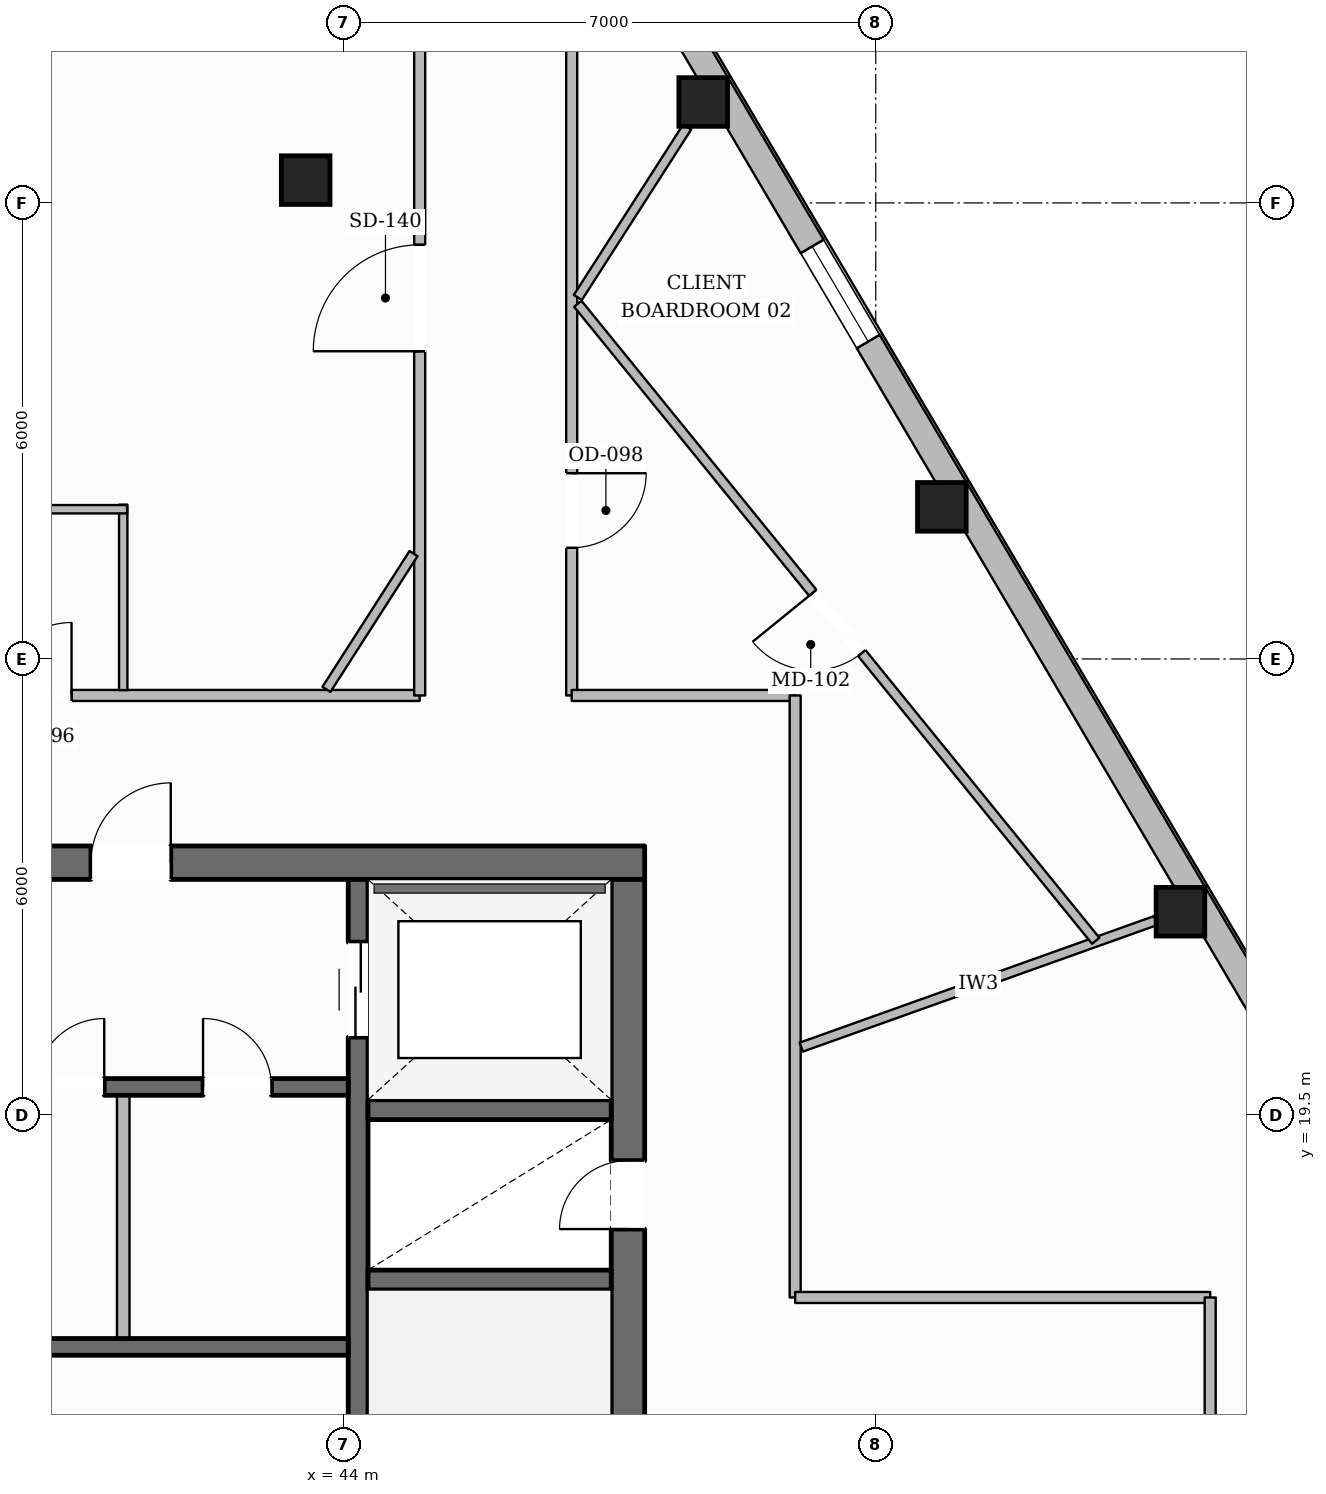
"""IFC4 building model, lengths in metres.
Left out: names, types, materials, properties, quantities, classifications, styles, units other than length and angle.
Written with IfcOpenShell. Run it as: python <this file> out.ifc"""

import sys

from ifc_helpers import new_model, si_unit, direction, frame, frame_2d, origin, origin_2d, place, context, subcontext, project, spatial, rectangle, hollow_rectangle, extrude, element, fill, save


model = new_model("IFC4")
c1 = context("Model", 3, precision=1e-05, world=origin(), true_north=direction((0.0, 1.0)))
c2 = subcontext(c1, "Body", "Model", "MODEL_VIEW")
j1 = project(units=[si_unit("LENGTHUNIT", "METRE"), si_unit("PLANEANGLEUNIT", "RADIAN")], contexts=[c1])
p1 = place(None, origin())
s1 = spatial("IfcSite", under=j1, at=p1, CompositionType="ELEMENT")
p2 = place(p1, origin())
s2 = spatial("IfcBuilding", under=s1, at=p2, CompositionType="ELEMENT")
p3 = place(p2, frame((0.0, 0.0, 195.8)))
s3 = spatial("IfcBuildingStorey", under=s2, at=p3, CompositionType="ELEMENT", Elevation=195.8)
p4 = place(p3, frame((28.04, 22.82, 0.0), z_axis=(0.0, 0.0, 1.0), x_axis=(1.0, 0.0, 0.0)))
e1 = element("IfcWall", 1, at=p4, inside=s3, PredefinedType="SOLIDWALL", context=c2, shape_type="SweptSolid", body=[
    extrude(rectangle(XDim=19.92, YDim=0.44, at=frame_2d((9.96, 0.0))), origin(), (0.0, 0.0, 1.0), 3.6),
])
p5 = place(p4, frame((6.235, 0.0, 0.0)))
e2 = element("IfcOpeningElement", 2, at=p5, cuts=e1, PredefinedType="OPENING", context=c2, shape_type="SweptSolid", body=[
    extrude(rectangle(XDim=1.05, YDim=2.15, at=frame_2d((0.525, 1.075))), frame((0.0, 0.23, 0.0), z_axis=(0.0, -1.0, 0.0), x_axis=(1.0, 0.0, 0.0)), (0.0, 0.0, 1.0), 0.46),
])
p6 = place(p4, frame((12.635, 0.0, 0.0)))
e3 = element("IfcOpeningElement", 3, at=p6, cuts=e1, PredefinedType="OPENING", context=c2, shape_type="SweptSolid", body=[
    extrude(rectangle(XDim=1.05, YDim=2.15, at=frame_2d((0.525, 1.075))), frame((0.0, 0.23, 0.0), z_axis=(0.0, -1.0, 0.0), x_axis=(1.0, 0.0, 0.0)), (0.0, 0.0, 1.0), 0.46),
])
p7 = place(p3, frame((47.74, 9.6, 0.0), z_axis=(0.0, 0.0, 1.0), x_axis=(0.0, 1.0, 0.0)))
e4 = element("IfcWall", 4, at=p7, inside=s3, PredefinedType="SOLIDWALL", context=c2, shape_type="SweptSolid", body=[
    extrude(rectangle(XDim=13.0, YDim=0.44, at=frame_2d((6.5, 0.0))), origin(), (0.0, 0.0, 1.0), 3.6),
])
p8 = place(p7, frame((0.2, 0.0, 0.0)))
e5 = element("IfcOpeningElement", 5, at=p8, cuts=e4, PredefinedType="OPENING", context=c2, shape_type="SweptSolid", body=[
    extrude(rectangle(XDim=1.1, YDim=2.15, at=frame_2d((0.55, 1.075))), frame((0.0, 0.23, 0.0), z_axis=(0.0, -1.0, 0.0), x_axis=(1.0, 0.0, 0.0)), (0.0, 0.0, 1.0), 0.46),
])
p9 = place(p7, frame((8.4, 0.0, 0.0)))
e6 = element("IfcOpeningElement", 6, at=p9, cuts=e4, PredefinedType="OPENING", context=c2, shape_type="SweptSolid", body=[
    extrude(rectangle(XDim=0.9, YDim=2.1, at=frame_2d((0.45, 1.05))), frame((0.0, 0.23, 0.0), z_axis=(0.0, -1.0, 0.0), x_axis=(1.0, 0.0, 0.0)), (0.0, 0.0, 1.0), 0.46),
])
p10 = place(p3, frame((44.19, 9.6, 0.0), z_axis=(0.0, 0.0, 1.0), x_axis=(0.0, 1.0, 0.0)))
e7 = element("IfcWall", 7, at=p10, inside=s3, PredefinedType="SHEAR", context=c2, shape_type="SweptSolid", body=[
    extrude(rectangle(XDim=13.0, YDim=0.26, at=frame_2d((6.5, 0.0))), origin(), (0.0, 0.0, 1.0), 3.6),
])
p11 = place(p10, frame((10.925, 0.0, 0.0)))
e8 = element("IfcOpeningElement", 8, at=p11, cuts=e7, PredefinedType="OPENING", context=c2, shape_type="SweptSolid", body=[
    extrude(rectangle(XDim=1.25, YDim=2.25, at=frame_2d((0.625, 1.125))), frame((0.0, 0.14, 0.0), z_axis=(0.0, -1.0, 0.0), x_axis=(1.0, 0.0, 0.0)), (0.0, 0.0, 1.0), 0.28),
])
for number, where, z_axis, x_axis in (
    (9, (44.32, 17.33, 0.0), (0.0, 0.0, 1.0), (1.0, 0.0, 0.0)),
    (10, (44.32, 19.57, 0.0), (0.0, 0.0, 1.0), (1.0, 0.0, 0.0)),
):
    element("IfcWall", number, at=place(p3, frame(where, z_axis=z_axis, x_axis=x_axis)), inside=s3, PredefinedType="SHEAR", context=c2, shape_type="SweptSolid", body=[
        extrude(rectangle(XDim=3.2, YDim=0.26, at=frame_2d((1.6, 0.0))), origin(), (0.0, 0.0, 1.0), 3.6),
    ])
p12 = place(p3, frame((31.94, 19.87, 0.0), z_axis=(0.0, 0.0, 1.0), x_axis=(1.0, 0.0, 0.0)))
e11 = element("IfcWall", 11, at=p12, inside=s3, PredefinedType="SOLIDWALL", context=c2, shape_type="SweptSolid", body=[
    extrude(rectangle(XDim=12.12, YDim=0.22, at=frame_2d((6.06, 0.0))), origin(), (0.0, 0.0, 1.0), 3.6),
])
p13 = place(p12, frame((6.3, 0.0, 0.0)))
e12 = element("IfcOpeningElement", 12, at=p13, cuts=e11, PredefinedType="OPENING", context=c2, shape_type="SweptSolid", body=[
    extrude(rectangle(XDim=1.1, YDim=2.15, at=frame_2d((0.55, 1.075))), frame((0.0, 0.12, 0.0), z_axis=(0.0, -1.0, 0.0), x_axis=(1.0, 0.0, 0.0)), (0.0, 0.0, 1.0), 0.24),
])
p14 = place(p12, frame((8.01, 0.0, 0.0)))
e13 = element("IfcOpeningElement", 13, at=p14, cuts=e11, PredefinedType="OPENING", context=c2, shape_type="SweptSolid", body=[
    extrude(rectangle(XDim=0.9, YDim=2.1, at=frame_2d((0.45, 1.05))), frame((0.0, 0.12, 0.0), z_axis=(0.0, -1.0, 0.0), x_axis=(1.0, 0.0, 0.0)), (0.0, 0.0, 1.0), 0.24),
])
p15 = place(p12, frame((10.21, 0.0, 0.0)))
e14 = element("IfcOpeningElement", 14, at=p15, cuts=e11, PredefinedType="OPENING", context=c2, shape_type="SweptSolid", body=[
    extrude(rectangle(XDim=0.9, YDim=2.1, at=frame_2d((0.45, 1.05))), frame((0.0, 0.12, 0.0), z_axis=(0.0, -1.0, 0.0), x_axis=(1.0, 0.0, 0.0)), (0.0, 0.0, 1.0), 0.24),
])
p16 = place(p3, frame((31.94, 16.45, 0.0), z_axis=(0.0, 0.0, 1.0), x_axis=(1.0, 0.0, 0.0)))
e15 = element("IfcWall", 15, at=p16, inside=s3, PredefinedType="SOLIDWALL", context=c2, shape_type="SweptSolid", body=[
    extrude(rectangle(XDim=12.12, YDim=0.22, at=frame_2d((6.06, 0.0))), origin(), (0.0, 0.0, 1.0), 3.6),
])
for number, where, z_axis, x_axis in (
    (16, (55.009, 22.175, 0.0), (0.0, 0.0, 1.0), (1.0, 0.0, 0.0)),
    (17, (51.87, 27.501, 0.0), (0.0, 0.0, 1.0), (1.0, 0.0, 0.0)),
    (18, (48.73, 32.828, 0.0), (0.0, 0.0, 1.0), (1.0, 0.0, 0.0)),
    (19, (43.5, 31.8, 0.0), (0.0, 0.0, 1.0), (1.0, 0.0, 0.0)),
):
    element("IfcColumn", number, at=place(p3, frame(where, z_axis=z_axis, x_axis=x_axis)), inside=s3, PredefinedType="COLUMN", context=c2, shape_type="SweptSolid", body=[
        extrude(hollow_rectangle(XDim=0.64, YDim=0.64, WallThickness=0.028, at=origin_2d()), origin(), (0.0, 0.0, 1.0), 3.6),
    ])
p17 = place(p3, frame((42.444, 44.024, 0.0), z_axis=(0.0, 0.0, 1.0), x_axis=(0.507770038723, -0.861492651028, 0.0)))
e20 = element("IfcWall", 20, at=p17, inside=s3, PredefinedType="STANDARD", context=c2, shape_type="SweptSolid", body=[
    extrude(rectangle(XDim=38.049, YDim=0.35, at=frame_2d((19.024, 0.0))), origin(), (0.0, 0.0, 1.0), 3.132),
])
p18 = place(p17, frame((33.752, 0.0, 0.65)))
e21 = element("IfcOpeningElement", 21, at=p18, cuts=e20, PredefinedType="OPENING", context=c2, shape_type="SweptSolid", body=[
    extrude(rectangle(XDim=1.45, YDim=1.75, at=frame_2d((0.725, 0.875))), frame((0.0, 0.185, 0.0), z_axis=(0.0, -1.0, 0.0), x_axis=(1.0, 0.0, 0.0)), (0.0, 0.0, 1.0), 0.37),
])
p19 = place(p17, frame((27.569, 0.0, 0.65)))
e22 = element("IfcOpeningElement", 22, at=p19, cuts=e20, PredefinedType="OPENING", context=c2, shape_type="SweptSolid", body=[
    extrude(rectangle(XDim=1.45, YDim=1.75, at=frame_2d((0.725, 0.875))), frame((0.0, 0.185, 0.0), z_axis=(0.0, -1.0, 0.0), x_axis=(1.0, 0.0, 0.0)), (0.0, 0.0, 1.0), 0.37),
])
p20 = place(p17, frame((15.204, 0.0, 0.65)))
e23 = element("IfcOpeningElement", 23, at=p20, cuts=e20, PredefinedType="OPENING", context=c2, shape_type="SweptSolid", body=[
    extrude(rectangle(XDim=1.45, YDim=1.75, at=frame_2d((0.725, 0.875))), frame((0.0, 0.185, 0.0), z_axis=(0.0, -1.0, 0.0), x_axis=(1.0, 0.0, 0.0)), (0.0, 0.0, 1.0), 0.37),
])
p21 = place(p17, frame((9.021, 0.0, 0.65)))
e24 = element("IfcOpeningElement", 24, at=p21, cuts=e20, PredefinedType="OPENING", context=c2, shape_type="SweptSolid", body=[
    extrude(rectangle(XDim=1.45, YDim=1.75, at=frame_2d((0.725, 0.875))), frame((0.0, 0.185, 0.0), z_axis=(0.0, -1.0, 0.0), x_axis=(1.0, 0.0, 0.0)), (0.0, 0.0, 1.0), 0.37),
])
p22 = place(p17, frame((2.839, 0.0, 0.65)))
e25 = element("IfcOpeningElement", 25, at=p22, cuts=e20, PredefinedType="OPENING", context=c2, shape_type="SweptSolid", body=[
    extrude(rectangle(XDim=1.45, YDim=1.75, at=frame_2d((0.725, 0.875))), frame((0.0, 0.185, 0.0), z_axis=(0.0, -1.0, 0.0), x_axis=(1.0, 0.0, 0.0)), (0.0, 0.0, 1.0), 0.37),
])
p23 = place(p3, frame((41.1, 16.56, 0.0), z_axis=(0.0, 0.0, 1.0), x_axis=(0.0, 1.0, 0.0)))
e26 = element("IfcWall", 26, at=p23, inside=s3, PredefinedType="PARTITIONING", context=c2, shape_type="SweptSolid", body=[
    extrude(rectangle(XDim=3.2, YDim=0.165, at=frame_2d((1.6, 0.0))), origin(), (0.0, 0.0, 1.0), 3.6),
])
p24 = place(p3, frame((31.0, 25.02, 0.0), z_axis=(0.0, 0.0, 1.0), x_axis=(1.0, 0.0, 0.0)))
e27 = element("IfcWall", 27, at=p24, inside=s3, PredefinedType="PARTITIONING", context=c2, shape_type="SweptSolid", body=[
    extrude(rectangle(XDim=14.0, YDim=0.145, at=frame_2d((7.0, 0.0))), origin(), (0.0, 0.0, 1.0), 3.6),
])
p25 = place(p24, frame((3.56, 0.0, 0.0)))
e28 = element("IfcOpeningElement", 28, at=p25, cuts=e27, PredefinedType="OPENING", context=c2, shape_type="SweptSolid", body=[
    extrude(rectangle(XDim=0.88, YDim=2.1, at=frame_2d((0.44, 1.05))), frame((0.0, 0.083, 0.0), z_axis=(0.0, -1.0, 0.0), x_axis=(1.0, 0.0, 0.0)), (0.0, 0.0, 1.0), 0.165),
])
p26 = place(p24, frame((6.08, 0.0, 0.0)))
e29 = element("IfcOpeningElement", 29, at=p26, cuts=e27, PredefinedType="OPENING", context=c2, shape_type="SweptSolid", body=[
    extrude(rectangle(XDim=0.88, YDim=2.1, at=frame_2d((0.44, 1.05))), frame((0.0, 0.083, 0.0), z_axis=(0.0, -1.0, 0.0), x_axis=(1.0, 0.0, 0.0)), (0.0, 0.0, 1.0), 0.165),
])
p27 = place(p24, frame((8.46, 0.0, 0.0)))
e30 = element("IfcOpeningElement", 30, at=p27, cuts=e27, PredefinedType="OPENING", context=c2, shape_type="SweptSolid", body=[
    extrude(rectangle(XDim=0.96, YDim=2.1, at=frame_2d((0.48, 1.05))), frame((0.0, 0.083, 0.0), z_axis=(0.0, -1.0, 0.0), x_axis=(1.0, 0.0, 0.0)), (0.0, 0.0, 1.0), 0.165),
])
p28 = place(p3, frame((45.0, 25.02, 0.0), z_axis=(0.0, 0.0, 1.0), x_axis=(0.0, 1.0, 0.0)))
e31 = element("IfcWall", 31, at=p28, inside=s3, PredefinedType="PARTITIONING", context=c2, shape_type="SweptSolid", body=[
    extrude(rectangle(XDim=8.642, YDim=0.145, at=frame_2d((4.321, 0.0))), origin(), (0.0, 0.0, 1.0), 3.6),
])
p29 = place(p28, frame((4.529, 0.0, 0.0)))
e32 = element("IfcOpeningElement", 32, at=p29, cuts=e31, PredefinedType="OPENING", context=c2, shape_type="SweptSolid", body=[
    extrude(rectangle(XDim=1.4, YDim=2.2, at=frame_2d((0.7, 1.1))), frame((0.0, 0.083, 0.0), z_axis=(0.0, -1.0, 0.0), x_axis=(1.0, 0.0, 0.0)), (0.0, 0.0, 1.0), 0.165),
])
p30 = place(p3, frame((47.0, 33.662, 0.0), z_axis=(0.0, 0.0, 1.0), x_axis=(0.0, -1.0, 0.0)))
e33 = element("IfcWall", 33, at=p30, inside=s3, PredefinedType="PARTITIONING", context=c2, shape_type="SweptSolid", body=[
    extrude(rectangle(XDim=8.642, YDim=0.145, at=frame_2d((4.321, 0.0))), origin(), (0.0, 0.0, 1.0), 3.6),
])
p31 = place(p30, frame((5.718, 0.0, 0.0)))
e34 = element("IfcOpeningElement", 34, at=p31, cuts=e33, PredefinedType="OPENING", context=c2, shape_type="SweptSolid", body=[
    extrude(rectangle(XDim=0.98, YDim=2.15, at=frame_2d((0.49, 1.075))), frame((0.0, 0.083, 0.0), z_axis=(0.0, -1.0, 0.0), x_axis=(1.0, 0.0, 0.0)), (0.0, 0.0, 1.0), 0.165),
])
p32 = place(p3, frame((47.0, 25.02, 0.0), z_axis=(0.0, 0.0, 1.0), x_axis=(1.0, 0.0, 0.0)))
e35 = element("IfcWall", 35, at=p32, inside=s3, PredefinedType="PARTITIONING", context=c2, shape_type="SweptSolid", body=[
    extrude(rectangle(XDim=2.94, YDim=0.145, at=frame_2d((1.47, 0.0))), origin(), (0.0, 0.0, 1.0), 3.6),
])
p33 = place(p3, frame((49.94, 25.02, 0.0), z_axis=(0.0, 0.0, 1.0), x_axis=(0.0, -1.0, 0.0)))
e36 = element("IfcWall", 36, at=p33, inside=s3, PredefinedType="PARTITIONING", context=c2, shape_type="SweptSolid", body=[
    extrude(rectangle(XDim=7.92, YDim=0.145, at=frame_2d((3.96, 0.0))), origin(), (0.0, 0.0, 1.0), 3.339),
])
p34 = place(p3, frame((49.94, 17.1, 0.0), z_axis=(0.0, 0.0, 1.0), x_axis=(1.0, 0.0, 0.0)))
e37 = element("IfcWall", 37, at=p34, inside=s3, PredefinedType="PARTITIONING", context=c2, shape_type="SweptSolid", body=[
    extrude(rectangle(XDim=5.46, YDim=0.145, at=frame_2d((2.73, 0.0))), origin(), (0.0, 0.0, 1.0), 3.6),
])
p35 = place(p3, frame((55.4, 17.1, 0.0), z_axis=(0.0, 0.0, 1.0), x_axis=(0.0, -1.0, 0.0)))
e38 = element("IfcWall", 38, at=p35, inside=s3, PredefinedType="PARTITIONING", context=c2, shape_type="SweptSolid", body=[
    extrude(rectangle(XDim=2.0, YDim=0.145, at=frame_2d((1.0, 0.0))), origin(), (0.0, 0.0, 1.0), 3.339),
])
p36 = place(p3, frame((41.1, 25.09, 0.0), z_axis=(0.0, 0.0, 1.0), x_axis=(0.0, 1.0, 0.0)))
e39 = element("IfcWall", 39, at=p36, inside=s3, PredefinedType="PLUMBINGWALL", context=c2, shape_type="SweptSolid", body=[
    extrude(rectangle(XDim=2.44, YDim=0.11, at=frame_2d((1.22, 0.0))), origin(), (0.0, 0.0, 1.0), 3.6),
])
p37 = place(p3, frame((33.69, 27.47, 0.0), z_axis=(0.0, 0.0, 1.0), x_axis=(1.0, 0.0, 0.0)))
e40 = element("IfcWall", 40, at=p37, inside=s3, PredefinedType="PLUMBINGWALL", context=c2, shape_type="SweptSolid", body=[
    extrude(rectangle(XDim=7.46, YDim=0.11, at=frame_2d((3.73, 0.0))), origin(), (0.0, 0.0, 1.0), 3.6),
])
p38 = place(p3, frame((50.021, 20.393, 0.0), z_axis=(0.0, 0.0, 1.0), x_axis=(0.941734098286, 0.336358273462, 0.0)))
e41 = element("IfcWall", 41, at=p38, inside=s3, PredefinedType="PARTITIONING", context=c2, shape_type="SweptSolid", body=[
    extrude(rectangle(XDim=4.949, YDim=0.125, at=frame_2d((2.474, 0.0))), origin(), (0.0, 0.0, 1.0), 3.6),
])
p39 = place(p3, frame((43.774, 25.101, 0.0), z_axis=(0.0, 0.0, 1.0), x_axis=(0.539879343567, 0.8417424157, 0.0)))
e42 = element("IfcWall", 42, at=p39, inside=s3, PredefinedType="PARTITIONING", context=c2, shape_type="SweptSolid", body=[
    extrude(rectangle(XDim=2.122, YDim=0.125, at=frame_2d((1.061, 0.0))), origin(), (0.0, 0.0, 1.0), 3.6),
])
p40 = place(p3, frame((47.081, 30.256, 0.0), z_axis=(0.0, 0.0, 1.0), x_axis=(0.539947349499, 0.841698793969, 0.0)))
e43 = element("IfcWall", 43, at=p40, inside=s3, PredefinedType="PARTITIONING", context=c2, shape_type="SweptSolid", body=[
    extrude(rectangle(XDim=2.666, YDim=0.125, at=frame_2d((1.333, 0.0))), origin(), (0.0, 0.0, 1.0), 3.6),
])
p41 = place(p3, frame((53.894, 21.793, 0.0), z_axis=(0.0, 0.0, 1.0), x_axis=(-0.630861507456, 0.775895455851, 0.0)))
e44 = element("IfcWall", 44, at=p41, inside=s3, PredefinedType="PARTITIONING", context=c2, shape_type="SweptSolid", body=[
    extrude(rectangle(XDim=10.8, YDim=0.125, at=frame_2d((5.4, 0.0))), origin(), (0.0, 0.0, 1.0), 3.339),
])
p42 = place(p41, frame((4.88, 0.0, 0.0)))
e45 = element("IfcOpeningElement", 45, at=p42, cuts=e44, PredefinedType="OPENING", context=c2, shape_type="SweptSolid", body=[
    extrude(rectangle(XDim=1.02, YDim=2.15, at=frame_2d((0.51, 1.075))), frame((0.0, 0.073, 0.0), z_axis=(0.0, -1.0, 0.0), x_axis=(1.0, 0.0, 0.0)), (0.0, 0.0, 1.0), 0.145),
])
p43 = place(p20, origin())
e46 = element("IfcWindow", 46, at=p43, inside=s3, PartitioningType="SINGLE_PANEL", PredefinedType="WINDOW", context=c2, shape_type="SweptSolid", body=[
    extrude(rectangle(XDim=1.45, YDim=1.75, at=frame_2d((0.725, 0.875))), frame((0.0, 0.03, 0.0), z_axis=(0.0, -1.0, 0.0), x_axis=(1.0, 0.0, 0.0)), (0.0, 0.0, 1.0), 0.06),
])
fill(e23, e46)
p44 = place(p9, origin())
e47 = element("IfcDoor", 47, at=p44, inside=s3, OperationType="SINGLE_SWING_LEFT", PredefinedType="DOOR", context=c2, shape_type="SweptSolid", body=[
    extrude(rectangle(XDim=0.9, YDim=2.1, at=frame_2d((0.45, 1.05))), frame((0.0, 0.025, 0.0), z_axis=(0.0, -1.0, 0.0), x_axis=(1.0, 0.0, 0.0)), (0.0, 0.0, 1.0), 0.05),
])
fill(e6, e47)
p45 = place(p6, origin())
e48 = element("IfcDoor", 48, at=p45, inside=s3, OperationType="SINGLE_SWING_RIGHT", PredefinedType="DOOR", context=c2, shape_type="SweptSolid", body=[
    extrude(rectangle(XDim=1.05, YDim=2.15, at=frame_2d((0.525, 1.075))), frame((0.0, 0.025, 0.0), z_axis=(0.0, -1.0, 0.0), x_axis=(1.0, 0.0, 0.0)), (0.0, 0.0, 1.0), 0.05),
])
fill(e3, e48)
p46 = place(p11, origin())
e49 = element("IfcDoor", 49, at=p46, inside=s3, OperationType="DOUBLE_DOOR_SLIDING", PredefinedType="DOOR", context=c2, shape_type="SweptSolid", body=[
    extrude(rectangle(XDim=1.25, YDim=2.25, at=frame_2d((0.625, 1.125))), frame((0.0, 0.025, 0.0), z_axis=(0.0, -1.0, 0.0), x_axis=(1.0, 0.0, 0.0)), (0.0, 0.0, 1.0), 0.05),
])
fill(e8, e49)
p47 = place(p14, origin())
e50 = element("IfcDoor", 50, at=p47, inside=s3, OperationType="SINGLE_SWING_RIGHT", PredefinedType="DOOR", context=c2, shape_type="SweptSolid", body=[
    extrude(rectangle(XDim=0.9, YDim=2.1, at=frame_2d((0.45, 1.05))), frame((0.0, 0.025, 0.0), z_axis=(0.0, -1.0, 0.0), x_axis=(1.0, 0.0, 0.0)), (0.0, 0.0, 1.0), 0.05),
])
fill(e13, e50)
p48 = place(p15, origin())
e51 = element("IfcDoor", 51, at=p48, inside=s3, OperationType="SINGLE_SWING_LEFT", PredefinedType="DOOR", context=c2, shape_type="SweptSolid", body=[
    extrude(rectangle(XDim=0.9, YDim=2.1, at=frame_2d((0.45, 1.05))), frame((0.0, 0.025, 0.0), z_axis=(0.0, -1.0, 0.0), x_axis=(1.0, 0.0, 0.0)), (0.0, 0.0, 1.0), 0.05),
])
fill(e14, e51)
p49 = place(p27, origin())
e52 = element("IfcDoor", 52, at=p49, inside=s3, OperationType="SINGLE_SWING_RIGHT", PredefinedType="DOOR", context=c2, shape_type="SweptSolid", body=[
    extrude(rectangle(XDim=0.96, YDim=2.1, at=frame_2d((0.48, 1.05))), frame((0.0, 0.025, 0.0), z_axis=(0.0, -1.0, 0.0), x_axis=(1.0, 0.0, 0.0)), (0.0, 0.0, 1.0), 0.05),
])
fill(e30, e52)
p50 = place(p31, origin())
e53 = element("IfcDoor", 53, at=p50, inside=s3, OperationType="SINGLE_SWING_LEFT", PredefinedType="DOOR", context=c2, shape_type="SweptSolid", body=[
    extrude(rectangle(XDim=0.98, YDim=2.15, at=frame_2d((0.49, 1.075))), frame((0.0, 0.025, 0.0), z_axis=(0.0, -1.0, 0.0), x_axis=(1.0, 0.0, 0.0)), (0.0, 0.0, 1.0), 0.05),
])
fill(e34, e53)
p51 = place(p42, origin())
e54 = element("IfcDoor", 54, at=p51, inside=s3, OperationType="SINGLE_SWING_RIGHT", PredefinedType="DOOR", context=c2, shape_type="SweptSolid", body=[
    extrude(rectangle(XDim=1.02, YDim=2.15, at=frame_2d((0.51, 1.075))), frame((0.0, 0.025, 0.0), z_axis=(0.0, -1.0, 0.0), x_axis=(1.0, 0.0, 0.0)), (0.0, 0.0, 1.0), 0.05),
])
fill(e45, e54)
p52 = place(p29, origin())
e55 = element("IfcDoor", 55, at=p52, inside=s3, OperationType="SINGLE_SWING_LEFT", PredefinedType="DOOR", context=c2, shape_type="SweptSolid", body=[
    extrude(rectangle(XDim=1.4, YDim=2.2, at=frame_2d((0.7, 1.1))), frame((0.0, 0.025, 0.0), z_axis=(0.0, -1.0, 0.0), x_axis=(1.0, 0.0, 0.0)), (0.0, 0.0, 1.0), 0.05),
])
fill(e32, e55)
save(model, sys.argv[1])
